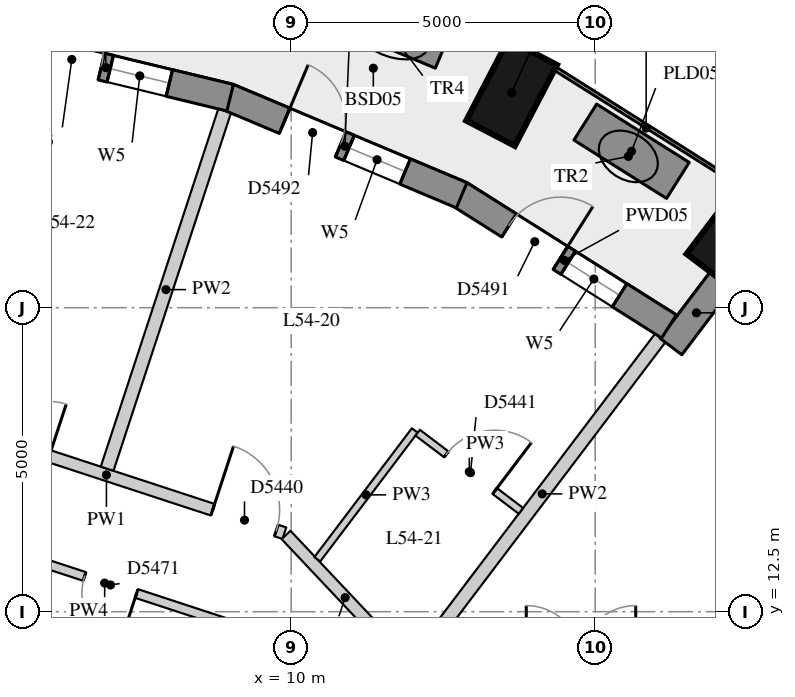
"""IFC4 building model, lengths in metres.
Left out: names, types, materials, properties, quantities, classifications, styles, units other than length and angle.
Written with IfcOpenShell. Run it as: python <this file> out.ifc"""

import sys

from ifc_helpers import new_model, si_unit, direction, frame, frame_2d, origin, origin_2d, place, context, subcontext, project, spatial, rectangle, extrude, element, fill, save


model = new_model("IFC4")
c1 = context("Model", 3, precision=1e-05, world=origin(), true_north=direction((0.0, 1.0)))
c2 = subcontext(c1, "Body", "Model", "MODEL_VIEW")
j1 = project(units=[si_unit("LENGTHUNIT", "METRE"), si_unit("PLANEANGLEUNIT", "RADIAN")], contexts=[c1])
p1 = place(None, origin())
s1 = spatial("IfcSite", under=j1, at=p1, CompositionType="ELEMENT")
p2 = place(p1, origin())
s2 = spatial("IfcBuilding", under=s1, at=p2, CompositionType="ELEMENT")
p3 = place(p2, frame((0.0, 0.0, 192.5)))
s3 = spatial("IfcBuildingStorey", under=s2, at=p3, CompositionType="ELEMENT", Elevation=192.5)
for number, where, z_axis, x_axis in (
    (1, (17.316, 18.71, 0.0), (0.0, 0.0, 1.0), (0.604, 0.797, 0.0)),
    (2, (13.625, 21.035, 0.0), (0.0, 0.0, 1.0), (0.462, 0.887, 0.0)),
):
    element("IfcColumn", number, at=place(p3, frame(where, z_axis=z_axis, x_axis=x_axis)), inside=s3, PredefinedType="COLUMN", context=c2, shape_type="SweptSolid", body=[
        extrude(rectangle(XDim=1.5, YDim=0.9, at=origin_2d()), origin(), (0.0, 0.0, 1.0), 3.3),
    ])
p4 = place(p3, frame((17.085, 17.97, 0.0), z_axis=(0.0, 0.0, 1.0), x_axis=(-0.603644757989, -0.797253414011, 0.0)))
e3 = element("IfcWall", 3, at=p4, inside=s3, PredefinedType="SOLIDWALL", context=c2, shape_type="SweptSolid", body=[
    extrude(rectangle(XDim=1.391, YDim=0.45, at=frame_2d((0.695, 0.0))), origin(), (0.0, 0.0, 1.0), 3.02),
])
p5 = place(p3, frame((16.213, 17.192, 0.0), z_axis=(0.0, 0.0, 1.0), x_axis=(-0.84545185308, 0.534051649303, 0.0)))
e4 = element("IfcWall", 4, at=p5, inside=s3, PredefinedType="SOLIDWALL", context=c2, shape_type="SweptSolid", body=[
    extrude(rectangle(XDim=4.071, YDim=0.45, at=frame_2d((2.036, 0.0))), origin(), (0.0, 0.0, 1.0), 3.02),
])
p6 = place(p5, frame((0.961, 0.0, 0.4)))
e5 = element("IfcOpeningElement", 5, at=p6, cuts=e4, PredefinedType="OPENING", context=c2, shape_type="SweptSolid", body=[
    extrude(rectangle(XDim=1.0, YDim=1.75, at=frame_2d((0.5, 0.875))), frame((0.0, 0.235, 0.0), z_axis=(0.0, -1.0, 0.0), x_axis=(1.0, 0.0, 0.0)), (0.0, 0.0, 1.0), 0.47),
])
p7 = place(p5, frame((2.111, 0.0, 0.0)))
e6 = element("IfcOpeningElement", 6, at=p7, cuts=e4, PredefinedType="OPENING", context=c2, shape_type="SweptSolid", body=[
    extrude(rectangle(XDim=1.0, YDim=2.15, at=frame_2d((0.5, 1.075))), frame((0.0, 0.235, 0.0), z_axis=(0.0, -1.0, 0.0), x_axis=(1.0, 0.0, 0.0)), (0.0, 0.0, 1.0), 0.47),
])
p8 = place(p3, frame((12.804, 19.349, 0.0), z_axis=(0.0, 0.0, 1.0), x_axis=(-0.921751093055, 0.387782055351, 0.0)))
e7 = element("IfcWall", 7, at=p8, inside=s3, PredefinedType="SOLIDWALL", context=c2, shape_type="SweptSolid", body=[
    extrude(rectangle(XDim=4.168, YDim=0.45, at=frame_2d((2.084, 0.0))), origin(), (0.0, 0.0, 1.0), 3.02),
])
p9 = place(p8, frame((1.009, 0.0, 0.4)))
e8 = element("IfcOpeningElement", 8, at=p9, cuts=e7, PredefinedType="OPENING", context=c2, shape_type="SweptSolid", body=[
    extrude(rectangle(XDim=1.0, YDim=1.75, at=frame_2d((0.5, 0.875))), frame((0.0, 0.235, 0.0), z_axis=(0.0, -1.0, 0.0), x_axis=(1.0, 0.0, 0.0)), (0.0, 0.0, 1.0), 0.47),
])
p10 = place(p8, frame((2.159, 0.0, 0.0)))
e9 = element("IfcOpeningElement", 9, at=p10, cuts=e7, PredefinedType="OPENING", context=c2, shape_type="SweptSolid", body=[
    extrude(rectangle(XDim=1.0, YDim=2.15, at=frame_2d((0.5, 1.075))), frame((0.0, 0.235, 0.0), z_axis=(0.0, -1.0, 0.0), x_axis=(1.0, 0.0, 0.0)), (0.0, 0.0, 1.0), 0.47),
])
p11 = place(p3, frame((8.996, 20.954, 0.0), z_axis=(0.0, 0.0, 1.0), x_axis=(-0.971994057868, 0.235005428593, 0.0)))
e10 = element("IfcWall", 10, at=p11, inside=s3, PredefinedType="SOLIDWALL", context=c2, shape_type="SweptSolid", body=[
    extrude(rectangle(XDim=4.208, YDim=0.45, at=frame_2d((2.104, 0.0))), origin(), (0.0, 0.0, 1.0), 3.02),
])
p12 = place(p11, frame((1.029, 0.0, 0.4)))
e11 = element("IfcOpeningElement", 11, at=p12, cuts=e10, PredefinedType="OPENING", context=c2, shape_type="SweptSolid", body=[
    extrude(rectangle(XDim=1.0, YDim=1.75, at=frame_2d((0.5, 0.875))), frame((0.0, 0.235, 0.0), z_axis=(0.0, -1.0, 0.0), x_axis=(1.0, 0.0, 0.0)), (0.0, 0.0, 1.0), 0.47),
])
p13 = place(p11, frame((2.179, 0.0, 0.0)))
e12 = element("IfcOpeningElement", 12, at=p13, cuts=e10, PredefinedType="OPENING", context=c2, shape_type="SweptSolid", body=[
    extrude(rectangle(XDim=1.0, YDim=2.15, at=frame_2d((0.5, 1.075))), frame((0.0, 0.235, 0.0), z_axis=(0.0, -1.0, 0.0), x_axis=(1.0, 0.0, 0.0)), (0.0, 0.0, 1.0), 0.47),
])
p14 = place(p3, frame((16.36, 19.593, 0.0), z_axis=(0.0, 0.0, 1.0), x_axis=(-0.846149017978, 0.532946375703, 0.0)))
e13 = element("IfcWall", 13, at=p14, inside=s3, PredefinedType="USERDEFINED", context=c2, shape_type="SweptSolid", body=[
    extrude(rectangle(XDim=1.8, YDim=0.7, at=frame_2d((0.9, 0.0))), origin(), (0.0, 0.0, 1.0), 0.75),
])
p15 = place(p3, frame((12.506, 21.762, 0.0), z_axis=(0.0, 0.0, 1.0), x_axis=(-0.922155368213, 0.386819695564, 0.0)))
e14 = element("IfcWall", 14, at=p15, inside=s3, PredefinedType="USERDEFINED", context=c2, shape_type="SweptSolid", body=[
    extrude(rectangle(XDim=1.8, YDim=0.7, at=frame_2d((0.9, 0.0))), origin(), (0.0, 0.0, 1.0), 0.75),
])
p16 = place(p3, frame((4.035, 15.708, 0.0), z_axis=(0.0, 0.0, 1.0), x_axis=(0.950331063317, -0.31124085544, 0.0)))
e15 = element("IfcWall", 15, at=p16, inside=s3, PredefinedType="PARTITIONING", context=c2, shape_type="SweptSolid", body=[
    extrude(rectangle(XDim=6.159, YDim=0.2, at=frame_2d((3.08, 0.0))), origin(), (0.0, 0.0, 1.0), 3.02),
])
p17 = place(p16, frame((4.919, 0.0, 0.0)))
e16 = element("IfcOpeningElement", 16, at=p17, cuts=e15, PredefinedType="OPENING", context=c2, shape_type="SweptSolid", body=[
    extrude(rectangle(XDim=1.1, YDim=2.1, at=frame_2d((0.55, 1.05))), frame((0.0, 0.11, 0.0), z_axis=(0.0, -1.0, 0.0), x_axis=(1.0, 0.0, 0.0)), (0.0, 0.0, 1.0), 0.22),
])
p18 = place(p16, frame((1.189, 0.0, 0.0)))
e17 = element("IfcOpeningElement", 17, at=p18, cuts=e15, PredefinedType="OPENING", context=c2, shape_type="SweptSolid", body=[
    extrude(rectangle(XDim=0.9, YDim=2.1, at=frame_2d((0.45, 1.05))), frame((0.0, 0.11, 0.0), z_axis=(0.0, -1.0, 0.0), x_axis=(1.0, 0.0, 0.0)), (0.0, 0.0, 1.0), 0.22),
])
p19 = place(p3, frame((9.916, 13.762, 0.0), z_axis=(0.0, 0.0, 1.0), x_axis=(0.686041532799, -0.727562378958, 0.0)))
e18 = element("IfcWall", 18, at=p19, inside=s3, PredefinedType="PARTITIONING", context=c2, shape_type="SweptSolid", body=[
    extrude(rectangle(XDim=2.834, YDim=0.2, at=frame_2d((1.417, 0.0))), origin(), (0.0, 0.0, 1.0), 3.02),
])
p20 = place(p3, frame((4.917, 13.631, 0.0), z_axis=(0.0, 0.0, 1.0), x_axis=(0.950299632499, -0.311336808733, 0.0)))
e19 = element("IfcWall", 19, at=p20, inside=s3, PredefinedType="PARTITIONING", context=c2, shape_type="SweptSolid", body=[
    extrude(rectangle(XDim=4.241, YDim=0.15, at=frame_2d((2.121, 0.0))), origin(), (0.0, 0.0, 1.0), 3.02),
])
p21 = place(p20, frame((1.773, 0.0, 0.0)))
e20 = element("IfcOpeningElement", 20, at=p21, cuts=e19, PredefinedType="OPENING", context=c2, shape_type="SweptSolid", body=[
    extrude(rectangle(XDim=0.9, YDim=2.1, at=frame_2d((0.45, 1.05))), frame((0.0, 0.085, 0.0), z_axis=(0.0, -1.0, 0.0), x_axis=(1.0, 0.0, 0.0)), (0.0, 0.0, 1.0), 0.17),
])
p22 = place(p3, frame((16.077, 17.011, 0.0), z_axis=(0.0, 0.0, 1.0), x_axis=(-0.603635635975, -0.797260320712, 0.0)))
e21 = element("IfcWall", 21, at=p22, inside=s3, PredefinedType="PARTITIONING", context=c2, shape_type="SweptSolid", body=[
    extrude(rectangle(XDim=6.457, YDim=0.22, at=frame_2d((3.229, 0.0))), origin(), (0.0, 0.0, 1.0), 3.02),
])
p23 = place(p3, frame((8.908, 20.743, 0.0), z_axis=(0.0, 0.0, 1.0), x_axis=(-0.311984764468, -0.950087104817, 0.0)))
e22 = element("IfcWall", 22, at=p23, inside=s3, PredefinedType="PARTITIONING", context=c2, shape_type="SweptSolid", body=[
    extrude(rectangle(XDim=6.202, YDim=0.22, at=frame_2d((3.101, 0.0))), origin(), (0.0, 0.0, 1.0), 3.02),
])
p24 = place(p3, frame((10.43, 13.363, 0.0), z_axis=(0.0, 0.0, 1.0), x_axis=(0.603597479969, 0.797289208616, 0.0)))
e23 = element("IfcWall", 23, at=p24, inside=s3, PredefinedType="PARTITIONING", context=c2, shape_type="SweptSolid", body=[
    extrude(rectangle(XDim=2.656, YDim=0.12, at=frame_2d((1.328, 0.0))), origin(), (0.0, 0.0, 1.0), 3.02),
])
p25 = place(p3, frame((12.081, 15.444, 0.0), z_axis=(0.0, 0.0, 1.0), x_axis=(0.797240905551, -0.603661277967, 0.0)))
e24 = element("IfcWall", 24, at=p25, inside=s3, PredefinedType="PARTITIONING", context=c2, shape_type="SweptSolid", body=[
    extrude(rectangle(XDim=2.13, YDim=0.12, at=frame_2d((1.065, 0.0))), origin(), (0.0, 0.0, 1.0), 3.02),
])
p26 = place(p25, frame((0.59, 0.0, 0.0)))
e25 = element("IfcOpeningElement", 25, at=p26, cuts=e24, PredefinedType="OPENING", context=c2, shape_type="SweptSolid", body=[
    extrude(rectangle(XDim=1.0, YDim=2.1, at=frame_2d((0.5, 1.05))), frame((0.0, 0.07, 0.0), z_axis=(0.0, -1.0, 0.0), x_axis=(1.0, 0.0, 0.0)), (0.0, 0.0, 1.0), 0.14),
])
p27 = place(p6, origin())
e26 = element("IfcWindow", 26, at=p27, inside=s3, PartitioningType="SINGLE_PANEL", PredefinedType="WINDOW", context=c2, shape_type="SweptSolid", body=[
    extrude(rectangle(XDim=1.0, YDim=1.75, at=frame_2d((0.5, 0.875))), frame((0.0, 0.035, 0.0), z_axis=(0.0, -1.0, 0.0), x_axis=(1.0, 0.0, 0.0)), (0.0, 0.0, 1.0), 0.06),
])
fill(e5, e26)
p28 = place(p7, frame((1.0, 0.0, 0.0), z_axis=(0.0, 0.0, 1.0), x_axis=(-1.0, 0.0, 0.0)))
e27 = element("IfcDoor", 27, at=p28, inside=s3, OperationType="SINGLE_SWING_RIGHT", PredefinedType="DOOR", context=c2, shape_type="SweptSolid", body=[
    extrude(rectangle(XDim=1.0, YDim=2.15, at=frame_2d((0.5, 1.075))), frame((0.0, 0.075, 0.0), z_axis=(0.0, -1.0, 0.0), x_axis=(1.0, 0.0, 0.0)), (0.0, 0.0, 1.0), 0.05),
])
fill(e6, e27)
p29 = place(p9, origin())
e28 = element("IfcWindow", 28, at=p29, inside=s3, PartitioningType="SINGLE_PANEL", PredefinedType="WINDOW", context=c2, shape_type="SweptSolid", body=[
    extrude(rectangle(XDim=1.0, YDim=1.75, at=frame_2d((0.5, 0.875))), frame((0.0, 0.035, 0.0), z_axis=(0.0, -1.0, 0.0), x_axis=(1.0, 0.0, 0.0)), (0.0, 0.0, 1.0), 0.06),
])
fill(e8, e28)
p30 = place(p10, frame((1.0, 0.0, 0.0), z_axis=(0.0, 0.0, 1.0), x_axis=(-1.0, 0.0, 0.0)))
e29 = element("IfcDoor", 29, at=p30, inside=s3, OperationType="SINGLE_SWING_LEFT", PredefinedType="DOOR", context=c2, shape_type="SweptSolid", body=[
    extrude(rectangle(XDim=1.0, YDim=2.15, at=frame_2d((0.5, 1.075))), frame((0.0, 0.075, 0.0), z_axis=(0.0, -1.0, 0.0), x_axis=(1.0, 0.0, 0.0)), (0.0, 0.0, 1.0), 0.05),
])
fill(e9, e29)
p31 = place(p12, origin())
e30 = element("IfcWindow", 30, at=p31, inside=s3, PartitioningType="SINGLE_PANEL", PredefinedType="WINDOW", context=c2, shape_type="SweptSolid", body=[
    extrude(rectangle(XDim=1.0, YDim=1.75, at=frame_2d((0.5, 0.875))), frame((0.0, 0.035, 0.0), z_axis=(0.0, -1.0, 0.0), x_axis=(1.0, 0.0, 0.0)), (0.0, 0.0, 1.0), 0.06),
])
fill(e11, e30)
p32 = place(p13, frame((1.0, 0.0, 0.0), z_axis=(0.0, 0.0, 1.0), x_axis=(-1.0, 0.0, 0.0)))
e31 = element("IfcDoor", 31, at=p32, inside=s3, OperationType="SINGLE_SWING_LEFT", PredefinedType="DOOR", context=c2, shape_type="SweptSolid", body=[
    extrude(rectangle(XDim=1.0, YDim=2.15, at=frame_2d((0.5, 1.075))), frame((0.0, 0.075, 0.0), z_axis=(0.0, -1.0, 0.0), x_axis=(1.0, 0.0, 0.0)), (0.0, 0.0, 1.0), 0.05),
])
fill(e12, e31)
p33 = place(p17, origin())
e32 = element("IfcDoor", 32, at=p33, inside=s3, OperationType="SINGLE_SWING_LEFT", PredefinedType="DOOR", context=c2, shape_type="SweptSolid", body=[
    extrude(rectangle(XDim=1.1, YDim=2.1, at=frame_2d((0.55, 1.05))), frame((0.0, 0.025, 0.0), z_axis=(0.0, -1.0, 0.0), x_axis=(1.0, 0.0, 0.0)), (0.0, 0.0, 1.0), 0.05),
])
fill(e16, e32)
p34 = place(p26, origin())
e33 = element("IfcDoor", 33, at=p34, inside=s3, OperationType="SINGLE_SWING_RIGHT", PredefinedType="DOOR", context=c2, shape_type="SweptSolid", body=[
    extrude(rectangle(XDim=1.0, YDim=2.1, at=frame_2d((0.5, 1.05))), frame((0.0, 0.025, 0.0), z_axis=(0.0, -1.0, 0.0), x_axis=(1.0, 0.0, 0.0)), (0.0, 0.0, 1.0), 0.05),
])
fill(e25, e33)
p35 = place(p21, origin())
e34 = element("IfcDoor", 34, at=p35, inside=s3, OperationType="SINGLE_SWING_LEFT", PredefinedType="DOOR", context=c2, shape_type="SweptSolid", body=[
    extrude(rectangle(XDim=0.9, YDim=2.1, at=frame_2d((0.45, 1.05))), frame((0.0, 0.025, 0.0), z_axis=(0.0, -1.0, 0.0), x_axis=(1.0, 0.0, 0.0)), (0.0, 0.0, 1.0), 0.05),
])
fill(e20, e34)
save(model, sys.argv[1])
